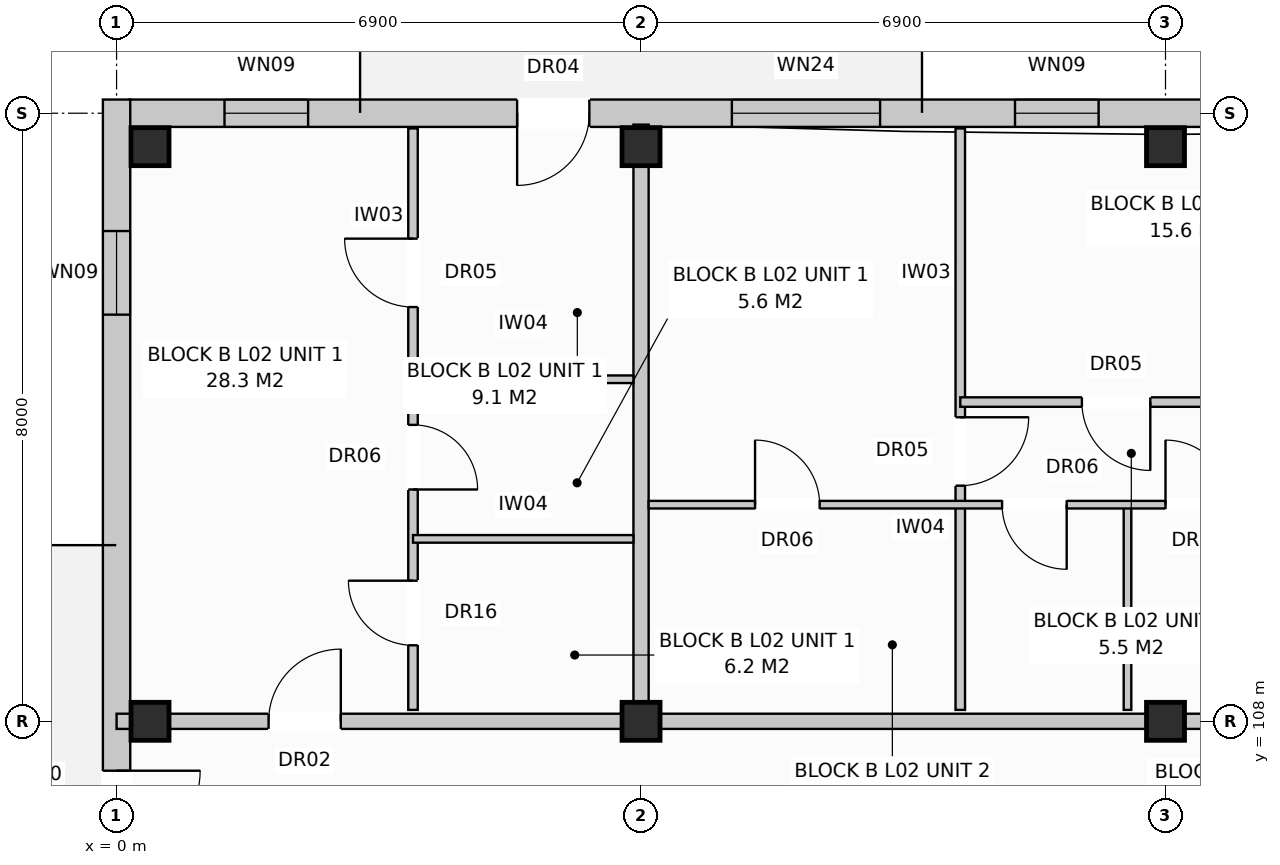
"""IFC4 building model, lengths in metres.
Left out: names, types, materials, properties, quantities, classifications, styles, units other than length and angle.
Written with IfcOpenShell. Run it as: python <this file> out.ifc"""

import sys

from ifc_helpers import new_model, si_unit, direction, frame, frame_2d, origin, origin_with_axes, origin_2d, place, context, subcontext, project, spatial, rectangle, extrude, element, fill, save


model = new_model("IFC4")
c1 = context("Model", 3, precision=1e-05, world=origin(), true_north=direction((0.0, 1.0)))
c2 = subcontext(c1, "Body", "Model", "MODEL_VIEW")
j1 = project(units=[si_unit("LENGTHUNIT", "METRE"), si_unit("PLANEANGLEUNIT", "RADIAN")], contexts=[c1])
p1 = place(None, origin())
s1 = spatial("IfcSite", under=j1, at=p1, CompositionType="ELEMENT")
p2 = place(p1, origin())
s2 = spatial("IfcBuilding", under=s1, at=p2, CompositionType="ELEMENT")
p3 = place(p2, frame((0.0, 0.0, 8.0)))
s3 = spatial("IfcBuildingStorey", under=s2, at=p3, CompositionType="ELEMENT", Elevation=8.0)
for number, where, z_axis, x_axis in (
    (1, (0.44, 108.0, 0.0), (0.0, 0.0, 1.0), (1.0, 0.0, 0.0)),
    (2, (0.44, 115.56, 0.0), (0.0, 0.0, 1.0), (1.0, 0.0, 0.0)),
    (3, (6.9, 108.0, 0.0), (0.0, 0.0, 1.0), (1.0, 0.0, 0.0)),
    (4, (6.9, 115.56, 0.0), (0.0, 0.0, 1.0), (1.0, 0.0, 0.0)),
    (5, (13.8, 108.0, 0.0), (0.0, 0.0, 1.0), (1.0, 0.0, 0.0)),
    (6, (13.8, 115.56, 0.0), (0.0, 0.0, 1.0), (1.0, 0.0, 0.0)),
):
    element("IfcColumn", number, at=place(p3, frame(where, z_axis=z_axis, x_axis=x_axis)), inside=s3, PredefinedType="COLUMN", context=c2, shape_type="SweptSolid", body=[
        extrude(rectangle(XDim=0.5, YDim=0.5, at=origin_2d()), origin(), (0.0, 0.0, 1.0), 3.2),
    ])
p4 = place(p3, frame((0.17, 116.0, 0.0), z_axis=(0.0, 0.0, 1.0), x_axis=(1.0, 0.0, 0.0)))
e7 = element("IfcWall", 7, at=p4, inside=s3, PredefinedType="STANDARD", context=c2, shape_type="SweptSolid", body=[
    extrude(rectangle(XDim=54.86, YDim=0.36, at=frame_2d((27.43, 0.0))), origin(), (0.0, 0.0, 1.0), 2.94),
])
p5 = place(p4, frame((5.1, 0.0, 0.0)))
e8 = element("IfcOpeningElement", 8, at=p5, cuts=e7, PredefinedType="OPENING", context=c2, shape_type="SweptSolid", body=[
    extrude(rectangle(XDim=0.95, YDim=2.1, at=frame_2d((0.475, 1.05))), frame((0.0, 0.192, 0.0), z_axis=(0.0, -1.0, 0.0), x_axis=(1.0, 0.0, 0.0)), (0.0, 0.0, 1.0), 0.384),
])
p6 = place(p4, frame((18.904, 0.0, 0.0)))
e9 = element("IfcOpeningElement", 9, at=p6, cuts=e7, PredefinedType="OPENING", context=c2, shape_type="SweptSolid", body=[
    extrude(rectangle(XDim=0.95, YDim=2.1, at=frame_2d((0.475, 1.05))), frame((0.0, 0.192, 0.0), z_axis=(0.0, -1.0, 0.0), x_axis=(1.0, 0.0, 0.0)), (0.0, 0.0, 1.0), 0.384),
])
p7 = place(p4, frame((32.704, 0.0, 0.0)))
e10 = element("IfcOpeningElement", 10, at=p7, cuts=e7, PredefinedType="OPENING", context=c2, shape_type="SweptSolid", body=[
    extrude(rectangle(XDim=0.95, YDim=2.1, at=frame_2d((0.475, 1.05))), frame((0.0, 0.192, 0.0), z_axis=(0.0, -1.0, 0.0), x_axis=(1.0, 0.0, 0.0)), (0.0, 0.0, 1.0), 0.384),
])
p8 = place(p4, frame((44.626, 0.0, 0.0)))
e11 = element("IfcOpeningElement", 11, at=p8, cuts=e7, PredefinedType="OPENING", context=c2, shape_type="SweptSolid", body=[
    extrude(rectangle(XDim=0.95, YDim=2.1, at=frame_2d((0.475, 1.05))), frame((0.0, 0.192, 0.0), z_axis=(0.0, -1.0, 0.0), x_axis=(1.0, 0.0, 0.0)), (0.0, 0.0, 1.0), 0.384),
])
p9 = place(p4, frame((1.25, 0.0, 0.72)))
e12 = element("IfcOpeningElement", 12, at=p9, cuts=e7, PredefinedType="OPENING", context=c2, shape_type="SweptSolid", body=[
    extrude(rectangle(XDim=1.1, YDim=1.5, at=frame_2d((0.55, 0.75))), frame((0.0, 0.192, 0.0), z_axis=(0.0, -1.0, 0.0), x_axis=(1.0, 0.0, 0.0)), (0.0, 0.0, 1.0), 0.384),
])
p10 = place(p4, frame((7.925, 0.0, 0.8)))
e13 = element("IfcOpeningElement", 13, at=p10, cuts=e7, PredefinedType="OPENING", context=c2, shape_type="SweptSolid", body=[
    extrude(rectangle(XDim=1.95, YDim=1.65, at=frame_2d((0.975, 0.825))), frame((0.0, 0.192, 0.0), z_axis=(0.0, -1.0, 0.0), x_axis=(1.0, 0.0, 0.0)), (0.0, 0.0, 1.0), 0.384),
])
p11 = place(p4, frame((11.65, 0.0, 0.72)))
e14 = element("IfcOpeningElement", 14, at=p11, cuts=e7, PredefinedType="OPENING", context=c2, shape_type="SweptSolid", body=[
    extrude(rectangle(XDim=1.1, YDim=1.5, at=frame_2d((0.55, 0.75))), frame((0.0, 0.192, 0.0), z_axis=(0.0, -1.0, 0.0), x_axis=(1.0, 0.0, 0.0)), (0.0, 0.0, 1.0), 0.384),
])
p12 = place(p4, frame((16.75, 0.0, 0.8)))
e15 = element("IfcOpeningElement", 15, at=p12, cuts=e7, PredefinedType="OPENING", context=c2, shape_type="SweptSolid", body=[
    extrude(rectangle(XDim=1.9, YDim=1.85, at=frame_2d((0.95, 0.925))), frame((0.0, 0.192, 0.0), z_axis=(0.0, -1.0, 0.0), x_axis=(1.0, 0.0, 0.0)), (0.0, 0.0, 1.0), 0.384),
])
p13 = place(p4, frame((22.225, 0.0, 0.8)))
e16 = element("IfcOpeningElement", 16, at=p13, cuts=e7, PredefinedType="OPENING", context=c2, shape_type="SweptSolid", body=[
    extrude(rectangle(XDim=1.95, YDim=1.65, at=frame_2d((0.975, 0.825))), frame((0.0, 0.192, 0.0), z_axis=(0.0, -1.0, 0.0), x_axis=(1.0, 0.0, 0.0)), (0.0, 0.0, 1.0), 0.384),
])
p14 = place(p4, frame((28.35, 0.0, 0.72)))
e17 = element("IfcOpeningElement", 17, at=p14, cuts=e7, PredefinedType="OPENING", context=c2, shape_type="SweptSolid", body=[
    extrude(rectangle(XDim=1.1, YDim=1.5, at=frame_2d((0.55, 0.75))), frame((0.0, 0.192, 0.0), z_axis=(0.0, -1.0, 0.0), x_axis=(1.0, 0.0, 0.0)), (0.0, 0.0, 1.0), 0.384),
])
p15 = place(p4, frame((30.55, 0.0, 0.8)))
e18 = element("IfcOpeningElement", 18, at=p15, cuts=e7, PredefinedType="OPENING", context=c2, shape_type="SweptSolid", body=[
    extrude(rectangle(XDim=1.9, YDim=1.85, at=frame_2d((0.95, 0.925))), frame((0.0, 0.192, 0.0), z_axis=(0.0, -1.0, 0.0), x_axis=(1.0, 0.0, 0.0)), (0.0, 0.0, 1.0), 0.384),
])
p16 = place(p4, frame((36.525, 0.0, 0.8)))
e19 = element("IfcOpeningElement", 19, at=p16, cuts=e7, PredefinedType="OPENING", context=c2, shape_type="SweptSolid", body=[
    extrude(rectangle(XDim=1.95, YDim=1.65, at=frame_2d((0.975, 0.825))), frame((0.0, 0.192, 0.0), z_axis=(0.0, -1.0, 0.0), x_axis=(1.0, 0.0, 0.0)), (0.0, 0.0, 1.0), 0.384),
])
p17 = place(p4, frame((42.65, 0.0, 0.72)))
e20 = element("IfcOpeningElement", 20, at=p17, cuts=e7, PredefinedType="OPENING", context=c2, shape_type="SweptSolid", body=[
    extrude(rectangle(XDim=1.1, YDim=1.5, at=frame_2d((0.55, 0.75))), frame((0.0, 0.192, 0.0), z_axis=(0.0, -1.0, 0.0), x_axis=(1.0, 0.0, 0.0)), (0.0, 0.0, 1.0), 0.384),
])
p18 = place(p4, frame((48.65, 0.0, 0.72)))
e21 = element("IfcOpeningElement", 21, at=p18, cuts=e7, PredefinedType="OPENING", context=c2, shape_type="SweptSolid", body=[
    extrude(rectangle(XDim=1.9, YDim=1.85, at=frame_2d((0.95, 0.925))), frame((0.0, 0.192, 0.0), z_axis=(0.0, -1.0, 0.0), x_axis=(1.0, 0.0, 0.0)), (0.0, 0.0, 1.0), 0.384),
])
p19 = place(p4, frame((52.45, 0.0, 0.72)))
e22 = element("IfcOpeningElement", 22, at=p19, cuts=e7, PredefinedType="OPENING", context=c2, shape_type="SweptSolid", body=[
    extrude(rectangle(XDim=1.1, YDim=1.5, at=frame_2d((0.55, 0.75))), frame((0.0, 0.192, 0.0), z_axis=(0.0, -1.0, 0.0), x_axis=(1.0, 0.0, 0.0)), (0.0, 0.0, 1.0), 0.384),
])
p20 = place(p3, frame((0.0, 97.42, 0.0), z_axis=(0.0, 0.0, 1.0), x_axis=(0.0, 1.0, 0.0)))
e23 = element("IfcWall", 23, at=p20, inside=s3, PredefinedType="STANDARD", context=c2, shape_type="SweptSolid", body=[
    extrude(rectangle(XDim=18.76, YDim=0.36, at=frame_2d((9.38, 0.0))), origin(), (0.0, 0.0, 1.0), 2.94),
])
p21 = place(p20, frame((8.83, 0.0, 0.0)))
e24 = element("IfcOpeningElement", 24, at=p21, cuts=e23, PredefinedType="OPENING", context=c2, shape_type="SweptSolid", body=[
    extrude(rectangle(XDim=1.1, YDim=2.1, at=frame_2d((0.55, 1.05))), frame((0.0, 0.192, 0.0), z_axis=(0.0, -1.0, 0.0), x_axis=(1.0, 0.0, 0.0)), (0.0, 0.0, 1.0), 0.384),
])
p22 = place(p20, frame((1.73, 0.0, 0.72)))
e25 = element("IfcOpeningElement", 25, at=p22, cuts=e23, PredefinedType="OPENING", context=c2, shape_type="SweptSolid", body=[
    extrude(rectangle(XDim=1.1, YDim=1.5, at=frame_2d((0.55, 0.75))), frame((0.0, 0.192, 0.0), z_axis=(0.0, -1.0, 0.0), x_axis=(1.0, 0.0, 0.0)), (0.0, 0.0, 1.0), 0.384),
])
p23 = place(p20, frame((15.93, 0.0, 0.72)))
e26 = element("IfcOpeningElement", 26, at=p23, cuts=e23, PredefinedType="OPENING", context=c2, shape_type="SweptSolid", body=[
    extrude(rectangle(XDim=1.1, YDim=1.5, at=frame_2d((0.55, 0.75))), frame((0.0, 0.192, 0.0), z_axis=(0.0, -1.0, 0.0), x_axis=(1.0, 0.0, 0.0)), (0.0, 0.0, 1.0), 0.384),
])
p24 = place(p3, frame((6.9, 108.15, 0.0), z_axis=(0.0, 0.0, 1.0), x_axis=(0.0, 1.0, 0.0)))
e27 = element("IfcWall", 27, at=p24, inside=s3, PredefinedType="PARTITIONING", context=c2, shape_type="SweptSolid", body=[
    extrude(rectangle(XDim=7.7, YDim=0.2, at=frame_2d((3.85, 0.0))), origin(), (0.0, 0.0, 1.0), 2.38),
])
p25 = place(p3, frame((0.0, 108.0, 0.0), z_axis=(0.0, 0.0, 1.0), x_axis=(1.0, 0.0, 0.0)))
e28 = element("IfcWall", 28, at=p25, inside=s3, PredefinedType="PARTITIONING", context=c2, shape_type="SweptSolid", body=[
    extrude(rectangle(XDim=6.9, YDim=0.2, at=frame_2d((3.45, 0.0))), origin(), (0.0, 0.0, 1.0), 2.38),
])
p26 = place(p25, frame((2.0, 0.0, 0.0)))
e29 = element("IfcOpeningElement", 29, at=p26, cuts=e28, PredefinedType="OPENING", context=c2, shape_type="SweptSolid", body=[
    extrude(rectangle(XDim=0.95, YDim=2.15, at=frame_2d((0.475, 1.075))), frame((0.0, 0.112, 0.0), z_axis=(0.0, -1.0, 0.0), x_axis=(1.0, 0.0, 0.0)), (0.0, 0.0, 1.0), 0.224),
])
p27 = place(p3, frame((3.9, 108.15, 0.0), z_axis=(0.0, 0.0, 1.0), x_axis=(0.0, 1.0, 0.0)))
e30 = element("IfcWall", 30, at=p27, inside=s3, PredefinedType="PARTITIONING", context=c2, shape_type="SweptSolid", body=[
    extrude(rectangle(XDim=7.65, YDim=0.125, at=frame_2d((3.825, 0.0))), origin(), (0.0, 0.0, 1.0), 2.94),
])
p28 = place(p27, frame((0.85, 0.0, 0.0)))
e31 = element("IfcOpeningElement", 31, at=p28, cuts=e30, PredefinedType="OPENING", context=c2, shape_type="SweptSolid", body=[
    extrude(rectangle(XDim=0.85, YDim=2.1, at=frame_2d((0.425, 1.05))), frame((0.0, 0.074, 0.0), z_axis=(0.0, -1.0, 0.0), x_axis=(1.0, 0.0, 0.0)), (0.0, 0.0, 1.0), 0.149),
])
p29 = place(p27, frame((2.9, 0.0, 0.0)))
e32 = element("IfcOpeningElement", 32, at=p29, cuts=e30, PredefinedType="OPENING", context=c2, shape_type="SweptSolid", body=[
    extrude(rectangle(XDim=0.85, YDim=2.05, at=frame_2d((0.425, 1.025))), frame((0.0, 0.074, 0.0), z_axis=(0.0, -1.0, 0.0), x_axis=(1.0, 0.0, 0.0)), (0.0, 0.0, 1.0), 0.149),
])
p30 = place(p27, frame((5.3, 0.0, 0.0)))
e33 = element("IfcOpeningElement", 33, at=p30, cuts=e30, PredefinedType="OPENING", context=c2, shape_type="SweptSolid", body=[
    extrude(rectangle(XDim=0.9, YDim=2.1, at=frame_2d((0.45, 1.05))), frame((0.0, 0.074, 0.0), z_axis=(0.0, -1.0, 0.0), x_axis=(1.0, 0.0, 0.0)), (0.0, 0.0, 1.0), 0.149),
])
for number, where, z_axis, x_axis in (
    (34, (3.9, 110.4, 0.0), (0.0, 0.0, 1.0), (1.0, 0.0, 0.0)),
    (35, (3.9, 112.5, 0.0), (0.0, 0.0, 1.0), (1.0, 0.0, 0.0)),
):
    element("IfcWall", number, at=place(p3, frame(where, z_axis=z_axis, x_axis=x_axis)), inside=s3, PredefinedType="PARTITIONING", context=c2, shape_type="SweptSolid", body=[
        extrude(rectangle(XDim=2.9, YDim=0.1, at=frame_2d((1.45, 0.0))), origin(), (0.0, 0.0, 1.0), 2.94),
    ])
p31 = place(p3, frame((6.9, 108.0, 0.0), z_axis=(0.0, 0.0, 1.0), x_axis=(1.0, 0.0, 0.0)))
e36 = element("IfcWall", 36, at=p31, inside=s3, PredefinedType="PARTITIONING", context=c2, shape_type="SweptSolid", body=[
    extrude(rectangle(XDim=13.8, YDim=0.2, at=frame_2d((6.9, 0.0))), origin(), (0.0, 0.0, 1.0), 2.38),
])
p32 = place(p31, frame((9.6, 0.0, 0.0)))
e37 = element("IfcOpeningElement", 37, at=p32, cuts=e36, PredefinedType="OPENING", context=c2, shape_type="SweptSolid", body=[
    extrude(rectangle(XDim=0.95, YDim=2.15, at=frame_2d((0.475, 1.075))), frame((0.0, 0.112, 0.0), z_axis=(0.0, -1.0, 0.0), x_axis=(1.0, 0.0, 0.0)), (0.0, 0.0, 1.0), 0.224),
])
p33 = place(p3, frame((11.1, 108.15, 0.0), z_axis=(0.0, 0.0, 1.0), x_axis=(0.0, 1.0, 0.0)))
e38 = element("IfcWall", 38, at=p33, inside=s3, PredefinedType="PARTITIONING", context=c2, shape_type="SweptSolid", body=[
    extrude(rectangle(XDim=7.65, YDim=0.125, at=frame_2d((3.825, 0.0))), origin(), (0.0, 0.0, 1.0), 2.94),
])
p34 = place(p33, frame((2.95, 0.0, 0.0)))
e39 = element("IfcOpeningElement", 39, at=p34, cuts=e38, PredefinedType="OPENING", context=c2, shape_type="SweptSolid", body=[
    extrude(rectangle(XDim=0.9, YDim=2.1, at=frame_2d((0.45, 1.05))), frame((0.0, 0.074, 0.0), z_axis=(0.0, -1.0, 0.0), x_axis=(1.0, 0.0, 0.0)), (0.0, 0.0, 1.0), 0.149),
])
p35 = place(p3, frame((13.3, 108.15, 0.0), z_axis=(0.0, 0.0, 1.0), x_axis=(0.0, 1.0, 0.0)))
e40 = element("IfcWall", 40, at=p35, inside=s3, PredefinedType="PARTITIONING", context=c2, shape_type="SweptSolid", body=[
    extrude(rectangle(XDim=2.7, YDim=0.1, at=frame_2d((1.35, 0.0))), origin(), (0.0, 0.0, 1.0), 2.94),
])
p36 = place(p3, frame((7.0, 110.85, 0.0), z_axis=(0.0, 0.0, 1.0), x_axis=(1.0, 0.0, 0.0)))
e41 = element("IfcWall", 41, at=p36, inside=s3, PredefinedType="PARTITIONING", context=c2, shape_type="SweptSolid", body=[
    extrude(rectangle(XDim=8.6, YDim=0.1, at=frame_2d((4.3, 0.0))), origin(), (0.0, 0.0, 1.0), 2.94),
])
p37 = place(p36, frame((1.4, 0.0, 0.0)))
e42 = element("IfcOpeningElement", 42, at=p37, cuts=e41, PredefinedType="OPENING", context=c2, shape_type="SweptSolid", body=[
    extrude(rectangle(XDim=0.85, YDim=2.05, at=frame_2d((0.425, 1.025))), frame((0.0, 0.062, 0.0), z_axis=(0.0, -1.0, 0.0), x_axis=(1.0, 0.0, 0.0)), (0.0, 0.0, 1.0), 0.124),
])
p38 = place(p36, frame((4.65, 0.0, 0.0)))
e43 = element("IfcOpeningElement", 43, at=p38, cuts=e41, PredefinedType="OPENING", context=c2, shape_type="SweptSolid", body=[
    extrude(rectangle(XDim=0.85, YDim=2.05, at=frame_2d((0.425, 1.025))), frame((0.0, 0.062, 0.0), z_axis=(0.0, -1.0, 0.0), x_axis=(1.0, 0.0, 0.0)), (0.0, 0.0, 1.0), 0.124),
])
p39 = place(p36, frame((6.8, 0.0, 0.0)))
e44 = element("IfcOpeningElement", 44, at=p39, cuts=e41, PredefinedType="OPENING", context=c2, shape_type="SweptSolid", body=[
    extrude(rectangle(XDim=0.85, YDim=2.1, at=frame_2d((0.425, 1.05))), frame((0.0, 0.062, 0.0), z_axis=(0.0, -1.0, 0.0), x_axis=(1.0, 0.0, 0.0)), (0.0, 0.0, 1.0), 0.124),
])
p40 = place(p3, frame((11.1, 112.2, 0.0), z_axis=(0.0, 0.0, 1.0), x_axis=(1.0, 0.0, 0.0)))
e45 = element("IfcWall", 45, at=p40, inside=s3, PredefinedType="PARTITIONING", context=c2, shape_type="SweptSolid", body=[
    extrude(rectangle(XDim=4.5, YDim=0.125, at=frame_2d((2.25, 0.0))), origin(), (0.0, 0.0, 1.0), 2.94),
])
p41 = place(p40, frame((1.6, 0.0, 0.0)))
e46 = element("IfcOpeningElement", 46, at=p41, cuts=e45, PredefinedType="OPENING", context=c2, shape_type="SweptSolid", body=[
    extrude(rectangle(XDim=0.9, YDim=2.1, at=frame_2d((0.45, 1.05))), frame((0.0, 0.074, 0.0), z_axis=(0.0, -1.0, 0.0), x_axis=(1.0, 0.0, 0.0)), (0.0, 0.0, 1.0), 0.149),
])
p42 = place(p5, frame((0.95, 0.0, 0.0), z_axis=(0.0, 0.0, 1.0), x_axis=(-1.0, 0.0, 0.0)))
e47 = element("IfcDoor", 47, at=p42, inside=s3, OperationType="SINGLE_SWING_LEFT", PredefinedType="DOOR", context=c2, shape_type="SweptSolid", body=[
    extrude(rectangle(XDim=0.95, YDim=2.1, at=frame_2d((0.475, 1.05))), frame((0.0, 0.025, 0.0), z_axis=(0.0, -1.0, 0.0), x_axis=(1.0, 0.0, 0.0)), (0.0, 0.0, 1.0), 0.05),
])
fill(e8, e47)
p43 = place(p9, origin_with_axes())
e48 = element("IfcWindow", 48, at=p43, inside=s3, PartitioningType="SINGLE_PANEL", PredefinedType="WINDOW", context=c2, shape_type="SweptSolid", body=[
    extrude(rectangle(XDim=1.1, YDim=1.5, at=frame_2d((0.55, 0.75))), frame((0.0, 0.03, 0.0), z_axis=(0.0, -1.0, 0.0), x_axis=(1.0, 0.0, 0.0)), (0.0, 0.0, 1.0), 0.06),
])
fill(e12, e48)
p44 = place(p10, origin_with_axes())
e49 = element("IfcWindow", 49, at=p44, inside=s3, PartitioningType="SINGLE_PANEL", PredefinedType="WINDOW", context=c2, shape_type="SweptSolid", body=[
    extrude(rectangle(XDim=1.95, YDim=1.65, at=frame_2d((0.975, 0.825))), frame((0.0, 0.03, 0.0), z_axis=(0.0, -1.0, 0.0), x_axis=(1.0, 0.0, 0.0)), (0.0, 0.0, 1.0), 0.06),
])
fill(e13, e49)
p45 = place(p11, origin_with_axes())
e50 = element("IfcWindow", 50, at=p45, inside=s3, PartitioningType="SINGLE_PANEL", PredefinedType="WINDOW", context=c2, shape_type="SweptSolid", body=[
    extrude(rectangle(XDim=1.1, YDim=1.5, at=frame_2d((0.55, 0.75))), frame((0.0, 0.03, 0.0), z_axis=(0.0, -1.0, 0.0), x_axis=(1.0, 0.0, 0.0)), (0.0, 0.0, 1.0), 0.06),
])
fill(e14, e50)
p46 = place(p21, frame((1.1, 0.0, 0.0), z_axis=(0.0, 0.0, 1.0), x_axis=(-1.0, 0.0, 0.0)))
e51 = element("IfcDoor", 51, at=p46, inside=s3, OperationType="SINGLE_SWING_RIGHT", PredefinedType="DOOR", context=c2, shape_type="SweptSolid", body=[
    extrude(rectangle(XDim=1.1, YDim=2.1, at=frame_2d((0.55, 1.05))), frame((0.0, 0.025, 0.0), z_axis=(0.0, -1.0, 0.0), x_axis=(1.0, 0.0, 0.0)), (0.0, 0.0, 1.0), 0.05),
])
fill(e24, e51)
p47 = place(p23, origin_with_axes())
e52 = element("IfcWindow", 52, at=p47, inside=s3, PartitioningType="SINGLE_PANEL", PredefinedType="WINDOW", context=c2, shape_type="SweptSolid", body=[
    extrude(rectangle(XDim=1.1, YDim=1.5, at=frame_2d((0.55, 0.75))), frame((0.0, 0.03, 0.0), z_axis=(0.0, -1.0, 0.0), x_axis=(1.0, 0.0, 0.0)), (0.0, 0.0, 1.0), 0.06),
])
fill(e26, e52)
p48 = place(p26, origin_with_axes())
e53 = element("IfcDoor", 53, at=p48, inside=s3, OperationType="SINGLE_SWING_RIGHT", PredefinedType="DOOR", context=c2, shape_type="SweptSolid", body=[
    extrude(rectangle(XDim=0.95, YDim=2.15, at=frame_2d((0.475, 1.075))), frame((0.0, 0.025, 0.0), z_axis=(0.0, -1.0, 0.0), x_axis=(1.0, 0.0, 0.0)), (0.0, 0.0, 1.0), 0.05),
])
fill(e29, e53)
p49 = place(p28, origin_with_axes())
e54 = element("IfcDoor", 54, at=p49, inside=s3, OperationType="SINGLE_SWING_RIGHT", PredefinedType="DOOR", context=c2, shape_type="SweptSolid", body=[
    extrude(rectangle(XDim=0.85, YDim=2.1, at=frame_2d((0.425, 1.05))), frame((0.0, 0.025, 0.0), z_axis=(0.0, -1.0, 0.0), x_axis=(1.0, 0.0, 0.0)), (0.0, 0.0, 1.0), 0.05),
])
fill(e31, e54)
p50 = place(p29, frame((0.85, 0.0, 0.0), z_axis=(0.0, 0.0, 1.0), x_axis=(-1.0, 0.0, 0.0)))
e55 = element("IfcDoor", 55, at=p50, inside=s3, OperationType="SINGLE_SWING_LEFT", PredefinedType="DOOR", context=c2, shape_type="SweptSolid", body=[
    extrude(rectangle(XDim=0.85, YDim=2.05, at=frame_2d((0.425, 1.025))), frame((0.0, 0.025, 0.0), z_axis=(0.0, -1.0, 0.0), x_axis=(1.0, 0.0, 0.0)), (0.0, 0.0, 1.0), 0.05),
])
fill(e32, e55)
p51 = place(p30, origin_with_axes())
e56 = element("IfcDoor", 56, at=p51, inside=s3, OperationType="SINGLE_SWING_RIGHT", PredefinedType="DOOR", context=c2, shape_type="SweptSolid", body=[
    extrude(rectangle(XDim=0.9, YDim=2.1, at=frame_2d((0.45, 1.05))), frame((0.0, 0.025, 0.0), z_axis=(0.0, -1.0, 0.0), x_axis=(1.0, 0.0, 0.0)), (0.0, 0.0, 1.0), 0.05),
])
fill(e33, e56)
p52 = place(p34, frame((0.9, 0.0, 0.0), z_axis=(0.0, 0.0, 1.0), x_axis=(-1.0, 0.0, 0.0)))
e57 = element("IfcDoor", 57, at=p52, inside=s3, OperationType="SINGLE_SWING_RIGHT", PredefinedType="DOOR", context=c2, shape_type="SweptSolid", body=[
    extrude(rectangle(XDim=0.9, YDim=2.1, at=frame_2d((0.45, 1.05))), frame((0.0, 0.025, 0.0), z_axis=(0.0, -1.0, 0.0), x_axis=(1.0, 0.0, 0.0)), (0.0, 0.0, 1.0), 0.05),
])
fill(e39, e57)
p53 = place(p37, origin_with_axes())
e58 = element("IfcDoor", 58, at=p53, inside=s3, OperationType="SINGLE_SWING_LEFT", PredefinedType="DOOR", context=c2, shape_type="SweptSolid", body=[
    extrude(rectangle(XDim=0.85, YDim=2.05, at=frame_2d((0.425, 1.025))), frame((0.0, 0.025, 0.0), z_axis=(0.0, -1.0, 0.0), x_axis=(1.0, 0.0, 0.0)), (0.0, 0.0, 1.0), 0.05),
])
fill(e42, e58)
p54 = place(p38, frame((0.85, 0.0, 0.0), z_axis=(0.0, 0.0, 1.0), x_axis=(-1.0, 0.0, 0.0)))
e59 = element("IfcDoor", 59, at=p54, inside=s3, OperationType="SINGLE_SWING_RIGHT", PredefinedType="DOOR", context=c2, shape_type="SweptSolid", body=[
    extrude(rectangle(XDim=0.85, YDim=2.05, at=frame_2d((0.425, 1.025))), frame((0.0, 0.025, 0.0), z_axis=(0.0, -1.0, 0.0), x_axis=(1.0, 0.0, 0.0)), (0.0, 0.0, 1.0), 0.05),
])
fill(e43, e59)
p55 = place(p39, origin_with_axes())
e60 = element("IfcDoor", 60, at=p55, inside=s3, OperationType="SINGLE_SWING_LEFT", PredefinedType="DOOR", context=c2, shape_type="SweptSolid", body=[
    extrude(rectangle(XDim=0.85, YDim=2.1, at=frame_2d((0.425, 1.05))), frame((0.0, 0.025, 0.0), z_axis=(0.0, -1.0, 0.0), x_axis=(1.0, 0.0, 0.0)), (0.0, 0.0, 1.0), 0.05),
])
fill(e44, e60)
p56 = place(p41, frame((0.9, 0.0, 0.0), z_axis=(0.0, 0.0, 1.0), x_axis=(-1.0, 0.0, 0.0)))
e61 = element("IfcDoor", 61, at=p56, inside=s3, OperationType="SINGLE_SWING_RIGHT", PredefinedType="DOOR", context=c2, shape_type="SweptSolid", body=[
    extrude(rectangle(XDim=0.9, YDim=2.1, at=frame_2d((0.45, 1.05))), frame((0.0, 0.025, 0.0), z_axis=(0.0, -1.0, 0.0), x_axis=(1.0, 0.0, 0.0)), (0.0, 0.0, 1.0), 0.05),
])
fill(e46, e61)
save(model, sys.argv[1])
